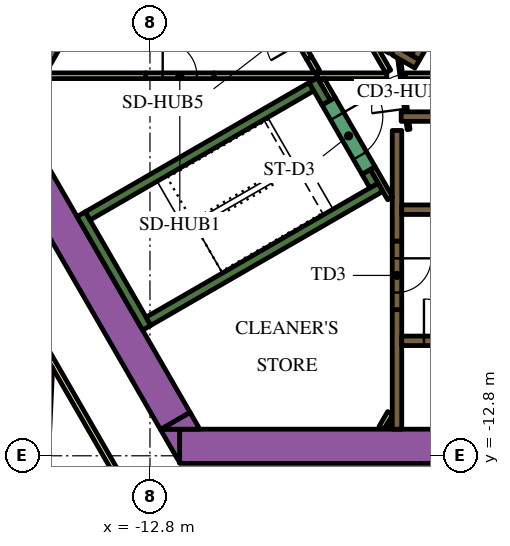
"""IFC4 building model, lengths in metres.
Left out: names, types, materials, properties, quantities, classifications, styles, units other than length and angle.
Written with IfcOpenShell. Run it as: python <this file> out.ifc"""

import sys

from ifc_helpers import new_model, si_unit, direction, frame, frame_2d, origin, place, context, subcontext, project, spatial, polyline, rectangle, outline, extrude, element, fill, save


model = new_model("IFC4")
c1 = context("Model", 3, precision=1e-05, world=origin(), true_north=direction((0.0, 1.0)))
c2 = subcontext(c1, "Body", "Model", "MODEL_VIEW")
j1 = project(units=[si_unit("LENGTHUNIT", "METRE"), si_unit("PLANEANGLEUNIT", "RADIAN")], contexts=[c1])
p1 = place(None, origin())
s1 = spatial("IfcSite", under=j1, at=p1, CompositionType="ELEMENT")
p2 = place(p1, origin())
s2 = spatial("IfcBuilding", under=s1, at=p2, CompositionType="ELEMENT")
p3 = place(p2, frame((0.0, 0.0, 54.9)))
s3 = spatial("IfcBuildingStorey", under=s2, at=p3, CompositionType="ELEMENT", Elevation=54.9)
p4 = place(p3, frame((-12.019, -12.55, 0.0), z_axis=(0.0, 0.0, 1.0), x_axis=(1.0, 0.0, 0.0)))
e1 = element("IfcWall", 1, at=p4, inside=s3, PredefinedType="SOLIDWALL", context=c2, shape_type="SweptSolid", body=[
    extrude(rectangle(XDim=21.63, YDim=0.9, at=frame_2d((10.815, 0.0))), origin(), (0.0, 0.0, 1.0), 3.9),
])
p5 = place(p3, origin())
e2 = element("IfcWall", 2, at=p5, inside=s3, PredefinedType="SOLIDWALL", context=c2, shape_type="SweptSolid", body=[
    extrude(outline(polyline([(-12.529, -12.1), (-12.021, -12.1), (-12.021, -12.98), (-12.529, -12.1)])), origin(), (0.0, 0.0, 1.0), 3.9),
])
p6 = place(p3, frame((-12.134, -11.883, 0.0), z_axis=(0.0, 0.0, 1.0), x_axis=(-0.500005339912, 0.866022320763, 0.0)))
e3 = element("IfcWall", 3, at=p6, inside=s3, PredefinedType="SOLIDWALL", context=c2, shape_type="SweptSolid", body=[
    extrude(rectangle(XDim=9.488, YDim=0.9, at=frame_2d((4.744, 0.0))), origin(), (0.0, 0.0, 1.0), 3.9),
])
e4 = element("IfcWall", 4, at=p5, inside=s3, PredefinedType="SOLIDWALL", context=c2, shape_type="SweptSolid", body=[
    extrude(outline(polyline([(-11.489, -12.1), (-12.505, -12.1), (-11.743, -11.66), (-11.489, -12.1)])), origin(), (0.0, 0.0, 1.0), 3.9),
])
p7 = place(p3, frame((-15.118, -1.085, 0.0), z_axis=(0.0, 0.0, 1.0), x_axis=(-0.50006606081, -0.865987260198, 0.0)))
e5 = element("IfcWall", 5, at=p7, inside=s3, PredefinedType="SOLIDWALL", context=c2, shape_type="SweptSolid", body=[
    extrude(rectangle(XDim=2.481, YDim=0.9, at=frame_2d((1.24, 0.0))), origin(), (0.0, 0.0, 1.0), 3.9),
])
p8 = place(p3, frame((-12.885, -9.431, 0.0), z_axis=(0.0, 0.0, 1.0), x_axis=(-0.500020560727, 0.866013532718, 0.0)))
e6 = element("IfcWall", 6, at=p8, inside=s3, PredefinedType="SOLIDWALL", context=c2, shape_type="SweptSolid", body=[
    extrude(rectangle(XDim=3.45, YDim=0.25, at=frame_2d((1.725, 0.0))), origin(), (0.0, 0.0, 1.0), 3.9),
])
p9 = place(p3, frame((-14.44, -6.49, 0.0), z_axis=(0.0, 0.0, 1.0), x_axis=(0.866022966069, 0.500004222222, 0.0)))
e7 = element("IfcWall", 7, at=p9, inside=s3, PredefinedType="SOLIDWALL", context=c2, shape_type="SweptSolid", body=[
    extrude(rectangle(XDim=6.8, YDim=0.25, at=frame_2d((3.4, 0.0))), origin(), (0.0, 0.0, 1.0), 3.9),
])
p10 = place(p3, frame((-8.163, -3.511, 0.0), z_axis=(0.0, 0.0, 1.0), x_axis=(-0.500206266495, 0.865906283012, 0.0)))
e8 = element("IfcWall", 8, at=p10, inside=s3, PredefinedType="SOLIDWALL", context=c2, shape_type="SweptSolid", body=[
    extrude(rectangle(XDim=0.684, YDim=0.25, at=frame_2d((0.342, 0.0))), origin(), (0.0, 0.0, 1.0), 3.9),
])
p11 = place(p3, frame((-12.84, -9.261, 0.0), z_axis=(0.0, 0.0, 1.0), x_axis=(0.866016039709, 0.500016218704, 0.0)))
e9 = element("IfcWall", 9, at=p11, inside=s3, PredefinedType="SOLIDWALL", context=c2, shape_type="SweptSolid", body=[
    extrude(rectangle(XDim=7.05, YDim=0.25, at=frame_2d((3.525, 0.0))), origin(), (0.0, 0.0, 1.0), 3.9),
])
p12 = place(p3, frame((-6.905, -5.69, 0.0), z_axis=(0.0, 0.0, 1.0), x_axis=(-0.499993700073, 0.866029041019, 0.0)))
e10 = element("IfcWall", 10, at=p12, inside=s3, PredefinedType="SOLIDWALL", context=c2, shape_type="SweptSolid", body=[
    extrude(rectangle(XDim=0.416, YDim=0.25, at=frame_2d((0.208, 0.0))), origin(), (0.0, 0.0, 1.0), 3.9),
])
p13 = place(p3, frame((-6.3, -12.1, 0.0), z_axis=(0.0, 0.0, 1.0), x_axis=(0.0, 1.0, 0.0)))
e11 = element("IfcWall", 11, at=p13, inside=s3, PredefinedType="SOLIDWALL", context=c2, shape_type="SweptSolid", body=[
    extrude(rectangle(XDim=3.146, YDim=0.25, at=frame_2d((1.573, 0.0))), origin(), (0.0, 0.0, 1.0), 3.9),
])
p14 = place(p3, frame((-6.3, -4.24, 0.0), z_axis=(0.0, 0.0, 1.0), x_axis=(0.0, -1.0, 0.0)))
e12 = element("IfcWall", 12, at=p14, inside=s3, PredefinedType="SOLIDWALL", context=c2, shape_type="SweptSolid", body=[
    extrude(rectangle(XDim=2.914, YDim=0.25, at=frame_2d((1.457, 0.0))), origin(), (0.0, 0.0, 1.0), 3.9),
])
p15 = place(p3, frame((-6.19, -3.875, 0.0), z_axis=(0.0, 0.0, 1.0), x_axis=(1.0, 0.0, 0.0)))
e13 = element("IfcWall", 13, at=p15, inside=s3, PredefinedType="SOLIDWALL", context=c2, shape_type="SweptSolid", body=[
    extrude(rectangle(XDim=12.615, YDim=0.25, at=frame_2d((6.307, 0.0))), origin(), (0.0, 0.0, 1.0), 3.9),
])
e14 = element("IfcWall", 14, at=p5, inside=s3, PredefinedType="SOLIDWALL", context=c2, shape_type="SweptSolid", body=[
    extrude(outline(polyline([(-5.922, -2.257), (-5.922, -2.257), (-5.705, -2.382), (-5.83, -2.598), (-6.418, -2.258), (-6.433, -2.153), (-6.433, -2.153), (-6.433, -2.153), (-6.508, -2.163), (-6.508, -2.163), (-6.508, -2.163), (-6.501, -2.21), (-7.952, -1.373), (-7.827, -1.156), (-5.922, -2.257)])), origin(), (0.0, 0.0, 1.0), 3.9),
])
p16 = place(p3, frame((-6.708, -12.068, 0.0), z_axis=(0.0, 0.0, 1.0), x_axis=(0.500000789788, 0.8660249478, 0.0)))
e15 = element("IfcWall", 15, at=p16, inside=s3, PredefinedType="PARTITIONING", context=c2, shape_type="SweptSolid", body=[
    extrude(rectangle(XDim=0.456, YDim=0.15, at=frame_2d((0.228, 0.0))), origin(), (0.0, 0.0, 1.0), 2.75),
])
p17 = place(p3, frame((-6.534, -12.068, 0.0), z_axis=(0.0, 0.0, 1.0), x_axis=(0.500240224089, 0.865886665912, 0.0)))
e16 = element("IfcWall", 16, at=p17, inside=s3, PredefinedType="PARTITIONING", context=c2, shape_type="SweptSolid", body=[
    extrude(rectangle(XDim=0.109, YDim=0.15, at=frame_2d((0.054, 0.0))), origin(), (0.0, 0.0, 1.0), 2.75),
])
p18 = place(p3, frame((-6.48, -6.027, 0.0), z_axis=(0.0, 0.0, 1.0), x_axis=(-0.499936960004, 0.866061796884, 0.0)))
e17 = element("IfcWall", 17, at=p18, inside=s3, PredefinedType="PARTITIONING", context=c2, shape_type="SweptSolid", body=[
    extrude(rectangle(XDim=0.919, YDim=0.15, at=frame_2d((0.46, 0.0))), origin(), (0.0, 0.0, 1.0), 3.9),
])
p19 = place(p3, frame((-12.915, -2.8, 0.0), z_axis=(0.0, 0.0, 1.0), x_axis=(-1.0, 0.0, 0.0)))
e18 = element("IfcWall", 18, at=p19, inside=s3, PredefinedType="PARTITIONING", context=c2, shape_type="SweptSolid", body=[
    extrude(rectangle(XDim=2.637, YDim=0.15, at=frame_2d((1.318, 0.0))), origin(), (0.0, 0.0, 1.0), 2.75),
])
p20 = place(p3, frame((-8.395, -2.8, 0.0), z_axis=(0.0, 0.0, 1.0), x_axis=(1.0, 0.0, 0.0)))
e19 = element("IfcWall", 19, at=p20, inside=s3, PredefinedType="PARTITIONING", context=c2, shape_type="SweptSolid", body=[
    extrude(rectangle(XDim=1.828, YDim=0.15, at=frame_2d((0.914, 0.0))), origin(), (0.0, 0.0, 1.0), 2.75),
])
p21 = place(p3, frame((-11.115, -2.8, 0.0), z_axis=(0.0, 0.0, 1.0), x_axis=(1.0, 0.0, 0.0)))
e20 = element("IfcWall", 20, at=p21, inside=s3, PredefinedType="PARTITIONING", context=c2, shape_type="SweptSolid", body=[
    extrude(rectangle(XDim=2.708, YDim=0.15, at=frame_2d((1.354, 0.0))), origin(), (0.0, 0.0, 1.0), 2.75),
])
p22 = place(p3, frame((-6.531, -2.689, 0.0), z_axis=(0.0, 0.0, 1.0), x_axis=(-0.499967446111, 0.866044197965, 0.0)))
e21 = element("IfcWall", 21, at=p22, inside=s3, PredefinedType="PARTITIONING", context=c2, shape_type="SweptSolid", body=[
    extrude(rectangle(XDim=0.748, YDim=0.15, at=frame_2d((0.374, 0.0))), origin(), (0.0, 0.0, 1.0), 2.75),
])
p23 = place(p3, frame((-7.99, -3.412, 0.0), z_axis=(0.0, 0.0, 1.0), x_axis=(-0.500193841991, 0.86591346013, 0.0)))
e22 = element("IfcWall", 22, at=p23, inside=s3, PredefinedType="PARTITIONING", context=c2, shape_type="SweptSolid", body=[
    extrude(rectangle(XDim=0.583, YDim=0.15, at=frame_2d((0.292, 0.0))), origin(), (0.0, 0.0, 1.0), 2.75),
])
p24 = place(p3, frame((-8.612, -2.333, 0.0), z_axis=(0.0, 0.0, 1.0), x_axis=(0.500248216681, -0.86588204838, 0.0)))
e23 = element("IfcWall", 23, at=p24, inside=s3, PredefinedType="PARTITIONING", context=c2, shape_type="SweptSolid", body=[
    extrude(rectangle(XDim=0.415, YDim=0.15, at=frame_2d((0.208, 0.0))), origin(), (0.0, 0.0, 1.0), 2.75),
])
p25 = place(p3, frame((-6.086, -2.801, 0.0), z_axis=(0.0, 0.0, 1.0), x_axis=(1.0, 0.0, 0.0)))
e24 = element("IfcWall", 24, at=p25, inside=s3, PredefinedType="PARTITIONING", context=c2, shape_type="SweptSolid", body=[
    extrude(rectangle(XDim=7.524, YDim=0.15, at=frame_2d((3.762, 0.0))), origin(), (0.0, 0.0, 1.0), 2.75),
])
p26 = place(p3, frame((-6.175, -9.775, 0.0), z_axis=(0.0, 0.0, 1.0), x_axis=(1.0, 0.0, 0.0)))
e25 = element("IfcWall", 25, at=p26, inside=s3, PredefinedType="SOLIDWALL", context=c2, shape_type="SweptSolid", body=[
    extrude(rectangle(XDim=12.35, YDim=0.25, at=frame_2d((6.175, 0.0))), origin(), (0.0, 0.0, 1.0), 3.9),
])
p27 = place(p26, frame((0.585, 0.0, 0.0)))
e26 = element("IfcOpeningElement", 26, at=p27, cuts=e25, PredefinedType="OPENING", context=c2, shape_type="SweptSolid", body=[
    extrude(rectangle(XDim=1.1, YDim=2.1, at=frame_2d((0.55, 1.05))), frame((0.0, 0.135, 0.0), z_axis=(0.0, -1.0, 0.0), x_axis=(1.0, 0.0, 0.0)), (0.0, 0.0, 1.0), 0.27),
])
p28 = place(p26, frame((3.105, 0.0, 0.0)))
e27 = element("IfcOpeningElement", 27, at=p28, cuts=e25, PredefinedType="OPENING", context=c2, shape_type="SweptSolid", body=[
    extrude(rectangle(XDim=1.1, YDim=2.1, at=frame_2d((0.55, 1.05))), frame((0.0, 0.135, 0.0), z_axis=(0.0, -1.0, 0.0), x_axis=(1.0, 0.0, 0.0)), (0.0, 0.0, 1.0), 0.27),
])
p29 = place(p26, frame((5.625, 0.0, 0.0)))
e28 = element("IfcOpeningElement", 28, at=p29, cuts=e25, PredefinedType="OPENING", context=c2, shape_type="SweptSolid", body=[
    extrude(rectangle(XDim=1.1, YDim=2.1, at=frame_2d((0.55, 1.05))), frame((0.0, 0.135, 0.0), z_axis=(0.0, -1.0, 0.0), x_axis=(1.0, 0.0, 0.0)), (0.0, 0.0, 1.0), 0.27),
])
p30 = place(p26, frame((8.145, 0.0, 0.0)))
e29 = element("IfcOpeningElement", 29, at=p30, cuts=e25, PredefinedType="OPENING", context=c2, shape_type="SweptSolid", body=[
    extrude(rectangle(XDim=1.1, YDim=2.1, at=frame_2d((0.55, 1.05))), frame((0.0, 0.135, 0.0), z_axis=(0.0, -1.0, 0.0), x_axis=(1.0, 0.0, 0.0)), (0.0, 0.0, 1.0), 0.27),
])
p31 = place(p26, frame((10.665, 0.0, 0.0)))
e30 = element("IfcOpeningElement", 30, at=p31, cuts=e25, PredefinedType="OPENING", context=c2, shape_type="SweptSolid", body=[
    extrude(rectangle(XDim=1.1, YDim=2.1, at=frame_2d((0.55, 1.05))), frame((0.0, 0.135, 0.0), z_axis=(0.0, -1.0, 0.0), x_axis=(1.0, 0.0, 0.0)), (0.0, 0.0, 1.0), 0.27),
])
p32 = place(p3, frame((-6.175, -6.325, 0.0), z_axis=(0.0, 0.0, 1.0), x_axis=(1.0, 0.0, 0.0)))
e31 = element("IfcWall", 31, at=p32, inside=s3, PredefinedType="SOLIDWALL", context=c2, shape_type="SweptSolid", body=[
    extrude(rectangle(XDim=12.35, YDim=0.25, at=frame_2d((6.175, 0.0))), origin(), (0.0, 0.0, 1.0), 3.9),
])
p33 = place(p32, frame((3.205, 0.0, 0.0)))
e32 = element("IfcOpeningElement", 32, at=p33, cuts=e31, PredefinedType="OPENING", context=c2, shape_type="SweptSolid", body=[
    extrude(rectangle(XDim=0.9, YDim=2.1, at=frame_2d((0.45, 1.05))), frame((0.0, 0.135, 0.0), z_axis=(0.0, -1.0, 0.0), x_axis=(1.0, 0.0, 0.0)), (0.0, 0.0, 1.0), 0.27),
])
p34 = place(p32, frame((8.145, 0.0, 0.0)))
e33 = element("IfcOpeningElement", 33, at=p34, cuts=e31, PredefinedType="OPENING", context=c2, shape_type="SweptSolid", body=[
    extrude(rectangle(XDim=1.1, YDim=2.1, at=frame_2d((0.55, 1.05))), frame((0.0, 0.135, 0.0), z_axis=(0.0, -1.0, 0.0), x_axis=(1.0, 0.0, 0.0)), (0.0, 0.0, 1.0), 0.27),
])
p35 = place(p32, frame((10.665, 0.0, 0.0)))
e34 = element("IfcOpeningElement", 34, at=p35, cuts=e31, PredefinedType="OPENING", context=c2, shape_type="SweptSolid", body=[
    extrude(rectangle(XDim=1.1, YDim=2.1, at=frame_2d((0.55, 1.05))), frame((0.0, 0.135, 0.0), z_axis=(0.0, -1.0, 0.0), x_axis=(1.0, 0.0, 0.0)), (0.0, 0.0, 1.0), 0.27),
])
p36 = place(p3, frame((-0.898, 6.194, 0.0), z_axis=(0.0, 0.0, 1.0), x_axis=(-0.499996202215, -0.866027596426, 0.0)))
e35 = element("IfcWall", 35, at=p36, inside=s3, PredefinedType="SOLIDWALL", context=c2, shape_type="SweptSolid", body=[
    extrude(rectangle(XDim=9.83, YDim=0.25, at=frame_2d((4.915, 0.0))), origin(), (0.0, 0.0, 1.0), 3.9),
])
p37 = place(p36, frame((0.585, 0.0, 0.0)))
e36 = element("IfcOpeningElement", 36, at=p37, cuts=e35, PredefinedType="OPENING", context=c2, shape_type="SweptSolid", body=[
    extrude(rectangle(XDim=1.1, YDim=2.1, at=frame_2d((0.55, 1.05))), frame((0.0, 0.135, 0.0), z_axis=(0.0, -1.0, 0.0), x_axis=(1.0, 0.0, 0.0)), (0.0, 0.0, 1.0), 0.27),
])
p38 = place(p36, frame((3.105, 0.0, 0.0)))
e37 = element("IfcOpeningElement", 37, at=p38, cuts=e35, PredefinedType="OPENING", context=c2, shape_type="SweptSolid", body=[
    extrude(rectangle(XDim=1.1, YDim=2.1, at=frame_2d((0.55, 1.05))), frame((0.0, 0.135, 0.0), z_axis=(0.0, -1.0, 0.0), x_axis=(1.0, 0.0, 0.0)), (0.0, 0.0, 1.0), 0.27),
])
p39 = place(p36, frame((5.625, 0.0, 0.0)))
e38 = element("IfcOpeningElement", 38, at=p39, cuts=e35, PredefinedType="OPENING", context=c2, shape_type="SweptSolid", body=[
    extrude(rectangle(XDim=1.1, YDim=2.1, at=frame_2d((0.55, 1.05))), frame((0.0, 0.135, 0.0), z_axis=(0.0, -1.0, 0.0), x_axis=(1.0, 0.0, 0.0)), (0.0, 0.0, 1.0), 0.27),
])
p40 = place(p36, frame((8.145, 0.0, 0.0)))
e39 = element("IfcOpeningElement", 39, at=p40, cuts=e35, PredefinedType="OPENING", context=c2, shape_type="SweptSolid", body=[
    extrude(rectangle(XDim=1.1, YDim=2.1, at=frame_2d((0.55, 1.05))), frame((0.0, 0.135, 0.0), z_axis=(0.0, -1.0, 0.0), x_axis=(1.0, 0.0, 0.0)), (0.0, 0.0, 1.0), 0.27),
])
p41 = place(p3, frame((-8.098, -3.474, 0.0), z_axis=(0.0, 0.0, 1.0), x_axis=(0.49994051562, -0.866059744384, 0.0)))
e40 = element("IfcWall", 40, at=p41, inside=s3, PredefinedType="SOLIDWALL", context=c2, shape_type="SweptSolid", body=[
    extrude(rectangle(XDim=2.1, YDim=0.4, at=frame_2d((1.05, 0.0))), origin(), (0.0, 0.0, 1.0), 3.9),
])
p42 = place(p41, frame((0.45, 0.0, 0.0)))
e41 = element("IfcOpeningElement", 41, at=p42, cuts=e40, PredefinedType="OPENING", context=c2, shape_type="SweptSolid", body=[
    extrude(rectangle(XDim=1.2, YDim=2.1, at=frame_2d((0.6, 1.05))), frame((0.0, 0.21, 0.0), z_axis=(0.0, -1.0, 0.0), x_axis=(1.0, 0.0, 0.0)), (0.0, 0.0, 1.0), 0.42),
])
p43 = place(p3, frame((-6.3, -7.154, 0.0), z_axis=(0.0, 0.0, 1.0), x_axis=(0.0, -1.0, 0.0)))
e42 = element("IfcWall", 42, at=p43, inside=s3, PredefinedType="SOLIDWALL", context=c2, shape_type="SweptSolid", body=[
    extrude(rectangle(XDim=1.8, YDim=0.25, at=frame_2d((0.9, 0.0))), origin(), (0.0, 0.0, 1.0), 3.9),
])
p44 = place(p43, frame((0.45, 0.0, 0.0)))
e43 = element("IfcOpeningElement", 43, at=p44, cuts=e42, PredefinedType="OPENING", context=c2, shape_type="SweptSolid", body=[
    extrude(rectangle(XDim=0.9, YDim=2.1, at=frame_2d((0.45, 1.05))), frame((0.0, 0.135, 0.0), z_axis=(0.0, -1.0, 0.0), x_axis=(1.0, 0.0, 0.0)), (0.0, 0.0, 1.0), 0.27),
])
p45 = place(p3, frame((-5.995, -4.213, 0.0), z_axis=(0.0, 0.0, 1.0), x_axis=(-0.132072335448, 0.991240081014, 0.0)))
e44 = element("IfcWall", 44, at=p45, inside=s3, PredefinedType="PARTITIONING", context=c2, shape_type="SweptSolid", body=[
    extrude(rectangle(XDim=2.1, YDim=0.076, at=frame_2d((1.05, 0.0))), origin(), (0.0, 0.0, 1.0), 2.75),
])
p46 = place(p45, frame((0.55, 0.0, 0.0)))
e45 = element("IfcOpeningElement", 45, at=p46, cuts=e44, PredefinedType="OPENING", context=c2, shape_type="SweptSolid", body=[
    extrude(rectangle(XDim=0.9, YDim=2.1, at=frame_2d((0.45, 1.05))), frame((0.0, 0.048, 0.0), z_axis=(0.0, -1.0, 0.0), x_axis=(1.0, 0.0, 0.0)), (0.0, 0.0, 1.0), 0.096),
])
p47 = place(p3, frame((-12.915, -2.8, 0.0), z_axis=(0.0, 0.0, 1.0), x_axis=(1.0, 0.0, 0.0)))
e46 = element("IfcWall", 46, at=p47, inside=s3, PredefinedType="PARTITIONING", context=c2, shape_type="SweptSolid", body=[
    extrude(rectangle(XDim=1.8, YDim=0.15, at=frame_2d((0.9, 0.0))), origin(), (0.0, 0.0, 1.0), 2.75),
])
p48 = place(p47, frame((0.45, 0.0, 0.0)))
e47 = element("IfcOpeningElement", 47, at=p48, cuts=e46, PredefinedType="OPENING", context=c2, shape_type="SweptSolid", body=[
    extrude(rectangle(XDim=0.9, YDim=2.1, at=frame_2d((0.45, 1.05))), frame((0.0, 0.085, 0.0), z_axis=(0.0, -1.0, 0.0), x_axis=(1.0, 0.0, 0.0)), (0.0, 0.0, 1.0), 0.17),
])
p49 = place(p3, frame((-8.612, -2.333, 0.0), z_axis=(0.0, 0.0, 1.0), x_axis=(-0.499961193289, 0.866047807691, 0.0)))
e48 = element("IfcWall", 48, at=p49, inside=s3, PredefinedType="PARTITIONING", context=c2, shape_type="SweptSolid", body=[
    extrude(rectangle(XDim=1.8, YDim=0.15, at=frame_2d((0.9, 0.0))), origin(), (0.0, 0.0, 1.0), 2.75),
])
p50 = place(p49, frame((0.45, 0.0, 0.0)))
e49 = element("IfcOpeningElement", 49, at=p50, cuts=e48, PredefinedType="OPENING", context=c2, shape_type="SweptSolid", body=[
    extrude(rectangle(XDim=0.9, YDim=2.1, at=frame_2d((0.45, 1.05))), frame((0.0, 0.085, 0.0), z_axis=(0.0, -1.0, 0.0), x_axis=(1.0, 0.0, 0.0)), (0.0, 0.0, 1.0), 0.17),
])
p51 = place(p3, frame((-19.081, -3.9, 0.0), z_axis=(0.0, 0.0, 1.0), x_axis=(0.499998313975, 0.866026377209, 0.0)))
e50 = element("IfcWall", 50, at=p51, inside=s3, PredefinedType="PARTITIONING", context=c2, shape_type="SweptSolid", body=[
    extrude(rectangle(XDim=25.766, YDim=0.15, at=frame_2d((12.883, 0.0))), origin(), (0.0, 0.0, 1.0), 2.75),
])
p52 = place(p51, frame((22.445, 0.0, 0.0)))
e51 = element("IfcOpeningElement", 51, at=p52, cuts=e50, PredefinedType="OPENING", context=c2, shape_type="SweptSolid", body=[
    extrude(rectangle(XDim=1.0, YDim=2.1, at=frame_2d((0.5, 1.05))), frame((0.0, 0.085, 0.0), z_axis=(0.0, -1.0, 0.0), x_axis=(1.0, 0.0, 0.0)), (0.0, 0.0, 1.0), 0.17),
])
p53 = place(p51, frame((21.138, 0.0, 0.0)))
e52 = element("IfcOpeningElement", 52, at=p53, cuts=e50, PredefinedType="OPENING", context=c2, shape_type="SweptSolid", body=[
    extrude(rectangle(XDim=1.0, YDim=2.1, at=frame_2d((0.5, 1.05))), frame((0.0, 0.085, 0.0), z_axis=(0.0, -1.0, 0.0), x_axis=(1.0, 0.0, 0.0)), (0.0, 0.0, 1.0), 0.17),
])
p54 = place(p51, frame((14.066, 0.0, 0.0)))
e53 = element("IfcOpeningElement", 53, at=p54, cuts=e50, PredefinedType="OPENING", context=c2, shape_type="SweptSolid", body=[
    extrude(rectangle(XDim=0.9, YDim=2.1, at=frame_2d((0.45, 1.05))), frame((0.0, 0.085, 0.0), z_axis=(0.0, -1.0, 0.0), x_axis=(1.0, 0.0, 0.0)), (0.0, 0.0, 1.0), 0.17),
])
p55 = place(p51, frame((11.693, 0.0, 0.0)))
e54 = element("IfcOpeningElement", 54, at=p55, cuts=e50, PredefinedType="OPENING", context=c2, shape_type="SweptSolid", body=[
    extrude(rectangle(XDim=1.0, YDim=2.1, at=frame_2d((0.5, 1.05))), frame((0.0, 0.085, 0.0), z_axis=(0.0, -1.0, 0.0), x_axis=(1.0, 0.0, 0.0)), (0.0, 0.0, 1.0), 0.17),
])
p56 = place(p3, frame((-12.918, -14.575, 0.0), z_axis=(0.0, 0.0, 1.0), x_axis=(-0.500009150678, 0.866020120573, 0.0)))
e55 = element("IfcWall", 55, at=p56, inside=s3, PredefinedType="PARTITIONING", context=c2, shape_type="SweptSolid", body=[
    extrude(rectangle(XDim=5.258, YDim=0.15, at=frame_2d((2.629, 0.0))), origin(), (0.0, 0.0, 1.0), 2.75),
])
p57 = place(p3, frame((-15.973, -22.109, 0.0), z_axis=(0.0, 0.0, 1.0), x_axis=(0.046191717129, 0.998932592955, 0.0)))
e56 = element("IfcWall", 56, at=p57, inside=s3, PredefinedType="PARTITIONING", context=c2, shape_type="SweptSolid", body=[
    extrude(rectangle(XDim=11.638, YDim=0.15, at=frame_2d((5.819, 0.0))), origin(), (0.0, 0.0, 1.0), 2.75),
])
p58 = place(p27, origin())
e57 = element("IfcDoor", 57, at=p58, inside=s3, OperationType="DOUBLE_DOOR_SLIDING", PredefinedType="DOOR", context=c2, shape_type="SweptSolid", body=[
    extrude(rectangle(XDim=1.1, YDim=2.1, at=frame_2d((0.55, 1.05))), frame((0.0, 0.025, 0.0), z_axis=(0.0, -1.0, 0.0), x_axis=(1.0, 0.0, 0.0)), (0.0, 0.0, 1.0), 0.05),
])
fill(e26, e57)
p59 = place(p42, origin())
e58 = element("IfcDoor", 58, at=p59, inside=s3, OperationType="SINGLE_SWING_LEFT", PredefinedType="DOOR", context=c2, shape_type="SweptSolid", body=[
    extrude(rectangle(XDim=1.2, YDim=2.1, at=frame_2d((0.6, 1.05))), frame((0.0, 0.025, 0.0), z_axis=(0.0, -1.0, 0.0), x_axis=(1.0, 0.0, 0.0)), (0.0, 0.0, 1.0), 0.05),
])
fill(e41, e58)
p60 = place(p44, origin())
e59 = element("IfcDoor", 59, at=p60, inside=s3, OperationType="SINGLE_SWING_LEFT", PredefinedType="DOOR", context=c2, shape_type="SweptSolid", body=[
    extrude(rectangle(XDim=0.9, YDim=2.1, at=frame_2d((0.45, 1.05))), frame((0.0, 0.025, 0.0), z_axis=(0.0, -1.0, 0.0), x_axis=(1.0, 0.0, 0.0)), (0.0, 0.0, 1.0), 0.05),
])
fill(e43, e59)
p61 = place(p46, origin())
e60 = element("IfcDoor", 60, at=p61, inside=s3, OperationType="SINGLE_SWING_LEFT", PredefinedType="DOOR", context=c2, shape_type="SweptSolid", body=[
    extrude(rectangle(XDim=0.9, YDim=2.1, at=frame_2d((0.45, 1.05))), frame((0.0, 0.025, 0.0), z_axis=(0.0, -1.0, 0.0), x_axis=(1.0, 0.0, 0.0)), (0.0, 0.0, 1.0), 0.05),
])
fill(e45, e60)
p62 = place(p48, origin())
e61 = element("IfcDoor", 61, at=p62, inside=s3, OperationType="SINGLE_SWING_LEFT", PredefinedType="DOOR", context=c2, shape_type="SweptSolid", body=[
    extrude(rectangle(XDim=0.9, YDim=2.1, at=frame_2d((0.45, 1.05))), frame((0.0, 0.025, 0.0), z_axis=(0.0, -1.0, 0.0), x_axis=(1.0, 0.0, 0.0)), (0.0, 0.0, 1.0), 0.05),
])
fill(e47, e61)
save(model, sys.argv[1])
